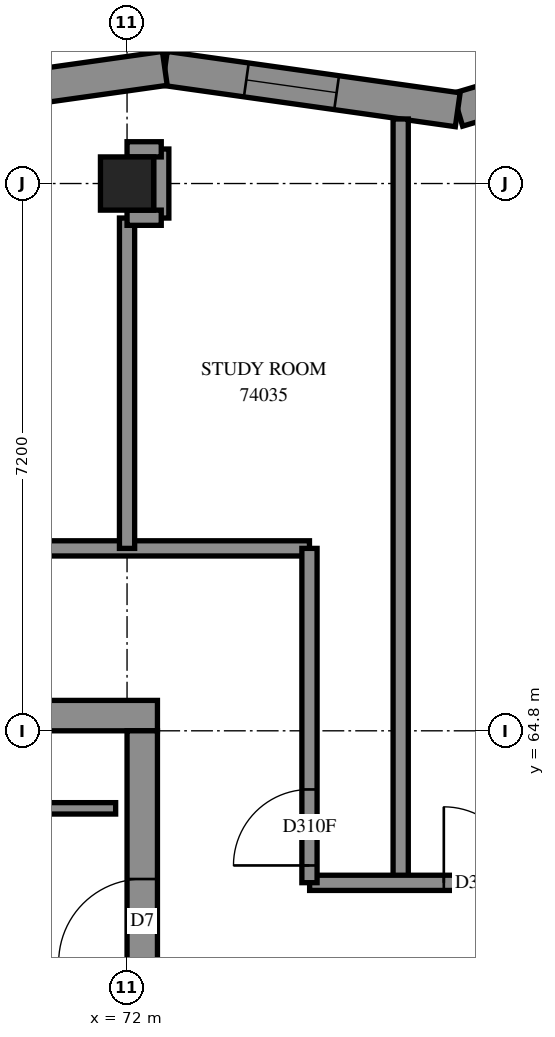
"""IFC4 building model, lengths in metres.
Left out: names, types, materials, properties, quantities, classifications, styles, units other than length and angle.
Written with IfcOpenShell. Run it as: python <this file> out.ifc"""

import sys

from ifc_helpers import new_model, si_unit, direction, frame, frame_2d, origin, origin_2d, place, context, subcontext, project, spatial, polyline, rectangle, outline, extrude, element, fill, save


model = new_model("IFC4")
c1 = context("Model", 3, precision=1e-05, world=origin(), true_north=direction((0.0, 1.0)))
c2 = subcontext(c1, "Body", "Model", "MODEL_VIEW")
j1 = project(units=[si_unit("LENGTHUNIT", "METRE"), si_unit("PLANEANGLEUNIT", "RADIAN")], contexts=[c1])
p1 = place(None, origin())
s1 = spatial("IfcSite", under=j1, at=p1, CompositionType="ELEMENT")
p2 = place(p1, origin())
s2 = spatial("IfcBuilding", under=s1, at=p2, CompositionType="ELEMENT")
p3 = place(p2, frame((0.0, 0.0, 271.0)))
s3 = spatial("IfcBuildingStorey", under=s2, at=p3, CompositionType="ELEMENT", Elevation=271.0)
p4 = place(p3, frame((72.0, 72.0, 0.0), z_axis=(0.0, 0.0, 1.0), x_axis=(1.0, 0.0, 0.0)))
e1 = element("IfcColumn", 1, at=p4, inside=s3, PredefinedType="COLUMN", context=c2, shape_type="SweptSolid", body=[
    extrude(rectangle(XDim=0.7, YDim=0.7, at=origin_2d()), origin(), (0.0, 0.0, 1.0), 3.1),
])
p5 = place(p3, frame((57.2, 65.0, -0.3), z_axis=(0.0, 0.0, 1.0), x_axis=(1.0, 0.0, 0.0)))
e2 = element("IfcWall", 2, at=p5, inside=s3, PredefinedType="SHEAR", context=c2, shape_type="SweptSolid", body=[
    extrude(rectangle(XDim=15.2, YDim=0.4, at=frame_2d((7.6, 0.0))), origin(), (0.0, 0.0, 1.0), 2.7),
])
p6 = place(p5, frame((10.4, 0.0, 0.3)))
e3 = element("IfcOpeningElement", 3, at=p6, cuts=e2, PredefinedType="OPENING", context=c2, shape_type="SweptSolid", body=[
    extrude(rectangle(XDim=0.8, YDim=2.1, at=frame_2d((0.4, 1.05))), frame((0.0, 0.21, 0.0), z_axis=(0.0, -1.0, 0.0), x_axis=(1.0, 0.0, 0.0)), (0.0, 0.0, 1.0), 0.42),
])
p7 = place(p3, frame((72.2, 50.4, -0.3), z_axis=(0.0, 0.0, 1.0), x_axis=(0.0, 1.0, 0.0)))
e4 = element("IfcWall", 4, at=p7, inside=s3, PredefinedType="SHEAR", context=c2, shape_type="SweptSolid", body=[
    extrude(rectangle(XDim=14.4, YDim=0.4, at=frame_2d((7.2, 0.0))), origin(), (0.0, 0.0, 1.0), 2.7),
])
p8 = place(p7, frame((4.55, 0.0, 0.3)))
e5 = element("IfcOpeningElement", 5, at=p8, cuts=e4, PredefinedType="OPENING", context=c2, shape_type="SweptSolid", body=[
    extrude(rectangle(XDim=1.1, YDim=2.1, at=frame_2d((0.55, 1.05))), frame((0.0, 0.21, 0.0), z_axis=(0.0, -1.0, 0.0), x_axis=(1.0, 0.0, 0.0)), (0.0, 0.0, 1.0), 0.42),
])
p9 = place(p7, frame((11.35, 0.0, 0.3)))
e6 = element("IfcOpeningElement", 6, at=p9, cuts=e4, PredefinedType="OPENING", context=c2, shape_type="SweptSolid", body=[
    extrude(rectangle(XDim=1.1, YDim=2.1, at=frame_2d((0.55, 1.05))), frame((0.0, 0.21, 0.0), z_axis=(0.0, -1.0, 0.0), x_axis=(1.0, 0.0, 0.0)), (0.0, 0.0, 1.0), 0.42),
])
p10 = place(p3, frame((80.052, 74.072, 0.0), z_axis=(0.0, 0.0, 1.0), x_axis=(-0.9584412894, -0.2852898434, 0.0)))
e7 = element("IfcWall", 7, at=p10, inside=s3, PredefinedType="SOLIDWALL", context=c2, shape_type="SweptSolid", body=[
    extrude(outline(polyline([(-0.19, -0.225), (3.813, -0.225), (3.911, 0.225), (0.19, 0.225), (-0.19, -0.225)])), origin(), (0.0, 0.0, 1.0), 3.1),
])
p11 = place(p10, frame((1.675, 0.0, 0.45)))
e8 = element("IfcOpeningElement", 8, at=p11, cuts=e7, PredefinedType="OPENING", context=c2, shape_type="SweptSolid", body=[
    extrude(rectangle(XDim=1.2, YDim=2.55, at=frame_2d((0.6, 1.275))), frame((0.0, 0.235, 0.0), z_axis=(0.0, -1.0, 0.0), x_axis=(1.0, 0.0, 0.0)), (0.0, 0.0, 1.0), 0.47),
])
p12 = place(p3, frame((76.351, 72.97, 0.0), z_axis=(0.0, 0.0, 1.0), x_axis=(-0.9901651862, 0.1399031953, 0.0)))
e9 = element("IfcWall", 9, at=p12, inside=s3, PredefinedType="SOLIDWALL", context=c2, shape_type="SweptSolid", body=[
    extrude(outline(polyline([(0.049, -0.225), (3.924, -0.225), (3.86, 0.225), (-0.049, 0.225), (0.049, -0.225)])), origin(), (0.0, 0.0, 1.0), 3.1),
])
p13 = place(p12, frame((1.609, 0.0, 0.45)))
e10 = element("IfcOpeningElement", 10, at=p13, cuts=e9, PredefinedType="OPENING", context=c2, shape_type="SweptSolid", body=[
    extrude(rectangle(XDim=1.2, YDim=2.55, at=frame_2d((0.6, 1.275))), frame((0.0, 0.235, 0.0), z_axis=(0.0, -1.0, 0.0), x_axis=(1.0, 0.0, 0.0)), (0.0, 0.0, 1.0), 0.47),
])
p14 = place(p3, frame((72.497, 73.515, 0.0), z_axis=(0.0, 0.0, 1.0), x_axis=(-0.9901681853, -0.1398819675, 0.0)))
e11 = element("IfcWall", 11, at=p14, inside=s3, PredefinedType="SOLIDWALL", context=c2, shape_type="SweptSolid", body=[
    extrude(outline(polyline([(-0.032, -0.225), (3.843, -0.225), (3.906, 0.225), (0.032, 0.225), (-0.032, -0.225)])), origin(), (0.0, 0.0, 1.0), 3.1),
])
p15 = place(p14, frame((1.583, 0.0, 0.45)))
e12 = element("IfcOpeningElement", 12, at=p15, cuts=e11, PredefinedType="OPENING", context=c2, shape_type="SweptSolid", body=[
    extrude(rectangle(XDim=1.2, YDim=2.55, at=frame_2d((0.6, 1.275))), frame((0.0, 0.235, 0.0), z_axis=(0.0, -1.0, 0.0), x_axis=(1.0, 0.0, 0.0)), (0.0, 0.0, 1.0), 0.47),
])
p16 = place(p3, frame((64.95, 63.78, 0.0), z_axis=(0.0, 0.0, 1.0), x_axis=(1.0, 0.0, 0.0)))
e13 = element("IfcWall", 13, at=p16, inside=s3, PredefinedType="PARTITIONING", context=c2, shape_type="SweptSolid", body=[
    extrude(rectangle(XDim=6.9, YDim=0.15, at=frame_2d((3.45, 0.0))), origin(), (0.0, 0.0, 1.0), 3.1),
])
p17 = place(p3, frame((55.2, 67.2, 0.0), z_axis=(0.0, 0.0, 1.0), x_axis=(1.0, 0.0, 0.0)))
e14 = element("IfcWall", 14, at=p17, inside=s3, PredefinedType="PARTITIONING", context=c2, shape_type="SweptSolid", body=[
    extrude(rectangle(XDim=19.2, YDim=0.2, at=frame_2d((9.6, 0.0))), origin(), (0.0, 0.0, 1.0), 3.1),
])
p18 = place(p17, frame((4.492, 0.0, 0.0)))
e15 = element("IfcOpeningElement", 15, at=p18, cuts=e14, PredefinedType="OPENING", context=c2, shape_type="SweptSolid", body=[
    extrude(rectangle(XDim=1.0, YDim=2.1, at=frame_2d((0.5, 1.05))), frame((0.0, 0.11, 0.0), z_axis=(0.0, -1.0, 0.0), x_axis=(1.0, 0.0, 0.0)), (0.0, 0.0, 1.0), 0.22),
])
p19 = place(p17, frame((6.567, 0.0, 0.0)))
e16 = element("IfcOpeningElement", 16, at=p19, cuts=e14, PredefinedType="OPENING", context=c2, shape_type="SweptSolid", body=[
    extrude(rectangle(XDim=1.0, YDim=2.1, at=frame_2d((0.5, 1.05))), frame((0.0, 0.11, 0.0), z_axis=(0.0, -1.0, 0.0), x_axis=(1.0, 0.0, 0.0)), (0.0, 0.0, 1.0), 0.22),
])
p20 = place(p17, frame((11.693, 0.0, 0.0)))
e17 = element("IfcOpeningElement", 17, at=p20, cuts=e14, PredefinedType="OPENING", context=c2, shape_type="SweptSolid", body=[
    extrude(rectangle(XDim=1.0, YDim=2.1, at=frame_2d((0.5, 1.05))), frame((0.0, 0.11, 0.0), z_axis=(0.0, -1.0, 0.0), x_axis=(1.0, 0.0, 0.0)), (0.0, 0.0, 1.0), 0.22),
])
p21 = place(p17, frame((13.88, 0.0, 0.0)))
e18 = element("IfcOpeningElement", 18, at=p21, cuts=e14, PredefinedType="OPENING", context=c2, shape_type="SweptSolid", body=[
    extrude(rectangle(XDim=1.0, YDim=2.1, at=frame_2d((0.5, 1.05))), frame((0.0, 0.11, 0.0), z_axis=(0.0, -1.0, 0.0), x_axis=(1.0, 0.0, 0.0)), (0.0, 0.0, 1.0), 0.22),
])
p22 = place(p3, frame((75.6, 62.8, 0.0), z_axis=(0.0, 0.0, 1.0), x_axis=(0.0, 1.0, 0.0)))
e19 = element("IfcWall", 19, at=p22, inside=s3, PredefinedType="PARTITIONING", context=c2, shape_type="SweptSolid", body=[
    extrude(rectangle(XDim=10.049, YDim=0.2, at=frame_2d((5.025, 0.0))), origin(), (0.0, 0.0, 1.0), 3.1),
])
p23 = place(p3, frame((74.402, 62.8, 0.0), z_axis=(0.0, 0.0, 1.0), x_axis=(1.0, 0.0, 0.0)))
e20 = element("IfcWall", 20, at=p23, inside=s3, PredefinedType="PARTITIONING", context=c2, shape_type="SweptSolid", body=[
    extrude(rectangle(XDim=4.798, YDim=0.2, at=frame_2d((2.399, 0.0))), origin(), (0.0, 0.0, 1.0), 3.1),
])
p24 = place(p23, frame((1.766, 0.0, 0.0)))
e21 = element("IfcOpeningElement", 21, at=p24, cuts=e20, PredefinedType="OPENING", context=c2, shape_type="SweptSolid", body=[
    extrude(rectangle(XDim=1.0, YDim=2.1, at=frame_2d((0.5, 1.05))), frame((0.0, 0.11, 0.0), z_axis=(0.0, -1.0, 0.0), x_axis=(1.0, 0.0, 0.0)), (0.0, 0.0, 1.0), 0.22),
])
p25 = place(p3, frame((74.4, 62.802, 0.0), z_axis=(0.0, 0.0, 1.0), x_axis=(0.0, 1.0, 0.0)))
e22 = element("IfcWall", 22, at=p25, inside=s3, PredefinedType="PARTITIONING", context=c2, shape_type="SweptSolid", body=[
    extrude(rectangle(XDim=4.398, YDim=0.2, at=frame_2d((2.199, 0.0))), origin(), (0.0, 0.0, 1.0), 3.1),
])
p26 = place(p25, frame((0.227, 0.0, 0.0)))
e23 = element("IfcOpeningElement", 23, at=p26, cuts=e22, PredefinedType="OPENING", context=c2, shape_type="SweptSolid", body=[
    extrude(rectangle(XDim=1.0, YDim=2.1, at=frame_2d((0.5, 1.05))), frame((0.0, 0.11, 0.0), z_axis=(0.0, -1.0, 0.0), x_axis=(1.0, 0.0, 0.0)), (0.0, 0.0, 1.0), 0.22),
])
p27 = place(p3, frame((72.0, 67.2, 0.0), z_axis=(0.0, 0.0, 1.0), x_axis=(0.0, 1.0, 0.0)))
e24 = element("IfcWall", 24, at=p27, inside=s3, PredefinedType="PARTITIONING", context=c2, shape_type="SweptSolid", body=[
    extrude(rectangle(XDim=4.346, YDim=0.2, at=frame_2d((2.173, 0.0))), origin(), (0.0, 0.0, 1.0), 3.1),
])
p28 = place(p3, frame((72.45, 71.546, 0.0), z_axis=(0.0, 0.0, 1.0), x_axis=(0.0, 1.0, 0.0)))
e25 = element("IfcWall", 25, at=p28, inside=s3, PredefinedType="PARTITIONING", context=c2, shape_type="SweptSolid", body=[
    extrude(rectangle(XDim=0.908, YDim=0.2, at=frame_2d((0.454, 0.0))), origin(), (0.0, 0.0, 1.0), 3.1),
])
for number, where, z_axis, x_axis in (
    (26, (72.0, 71.55, 0.0), (0.0, 0.0, 1.0), (1.0, 0.0, 0.0)),
    (27, (72.0, 72.45, 0.0), (0.0, 0.0, 1.0), (1.0, 0.0, 0.0)),
):
    element("IfcWall", number, at=place(p3, frame(where, z_axis=z_axis, x_axis=x_axis)), inside=s3, PredefinedType="PARTITIONING", context=c2, shape_type="SweptSolid", body=[
        extrude(rectangle(XDim=0.45, YDim=0.2, at=frame_2d((0.225, 0.0))), origin(), (0.0, 0.0, 1.0), 3.1),
    ])
p29 = place(p13, origin())
e28 = element("IfcWindow", 28, at=p29, inside=s3, PartitioningType="SINGLE_PANEL", PredefinedType="WINDOW", context=c2, shape_type="SweptSolid", body=[
    extrude(rectangle(XDim=1.2, YDim=2.55, at=frame_2d((0.6, 1.275))), frame((0.0, 0.205, 0.0), z_axis=(0.0, -1.0, 0.0), x_axis=(1.0, 0.0, 0.0)), (0.0, 0.0, 1.0), 0.06),
])
fill(e10, e28)
p30 = place(p9, origin())
e29 = element("IfcDoor", 29, at=p30, inside=s3, OperationType="SINGLE_SWING_RIGHT", PredefinedType="DOOR", context=c2, shape_type="SweptSolid", body=[
    extrude(rectangle(XDim=1.1, YDim=2.1, at=frame_2d((0.55, 1.05))), frame((0.0, 0.025, 0.0), z_axis=(0.0, -1.0, 0.0), x_axis=(1.0, 0.0, 0.0)), (0.0, 0.0, 1.0), 0.05),
])
fill(e6, e29)
p31 = place(p26, origin())
e30 = element("IfcDoor", 30, at=p31, inside=s3, OperationType="SINGLE_SWING_RIGHT", PredefinedType="DOOR", context=c2, shape_type="SweptSolid", body=[
    extrude(rectangle(XDim=1.0, YDim=2.1, at=frame_2d((0.5, 1.05))), frame((0.0, 0.025, 0.0), z_axis=(0.0, -1.0, 0.0), x_axis=(1.0, 0.0, 0.0)), (0.0, 0.0, 1.0), 0.05),
])
fill(e23, e30)
p32 = place(p24, origin())
e31 = element("IfcDoor", 31, at=p32, inside=s3, OperationType="SINGLE_SWING_LEFT", PredefinedType="DOOR", context=c2, shape_type="SweptSolid", body=[
    extrude(rectangle(XDim=1.0, YDim=2.1, at=frame_2d((0.5, 1.05))), frame((0.0, 0.025, 0.0), z_axis=(0.0, -1.0, 0.0), x_axis=(1.0, 0.0, 0.0)), (0.0, 0.0, 1.0), 0.05),
])
fill(e21, e31)
save(model, sys.argv[1])
